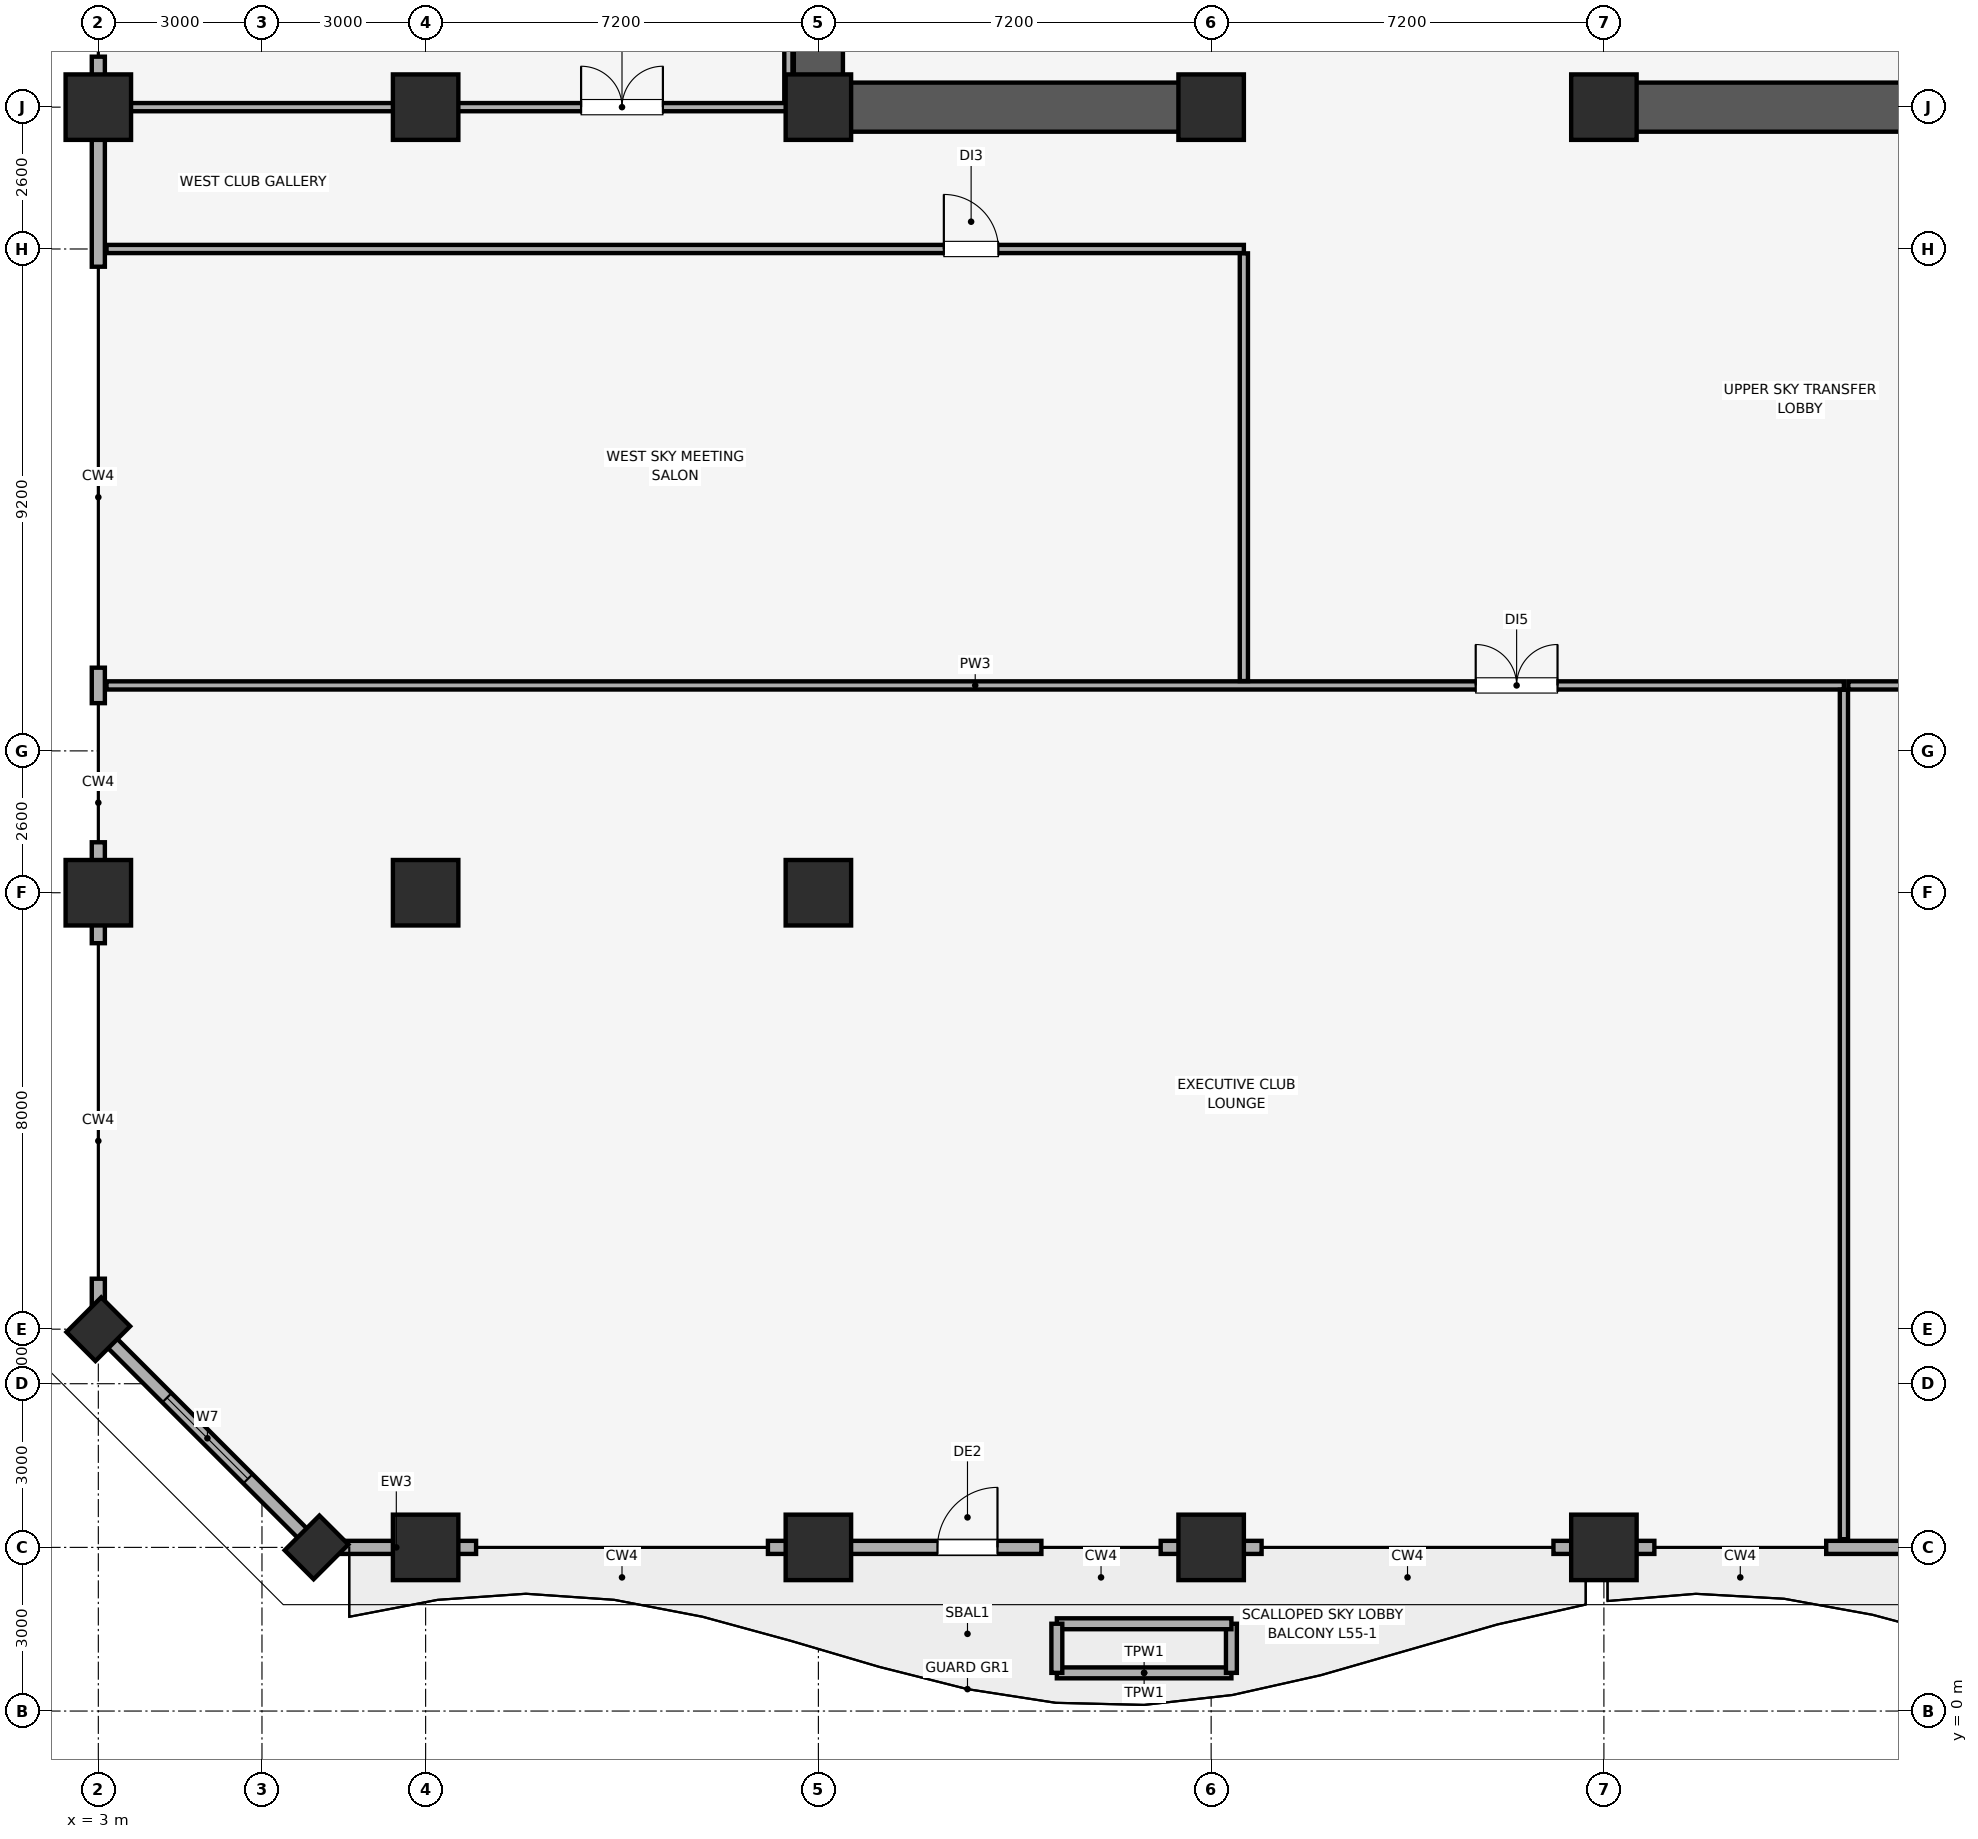
"""IFC4 building model, lengths in metres.
Left out: names, types, materials, properties, quantities, classifications, styles, units other than length and angle.
Written with IfcOpenShell. Run it as: python <this file> out.ifc"""

import sys

from ifc_helpers import new_model, si_unit, direction, frame, frame_2d, origin, origin_2d, place, context, subcontext, project, spatial, rectangle, extrude, element, fill, save


model = new_model("IFC4")
c1 = context("Model", 3, precision=1e-05, world=origin(), true_north=direction((0.0, 1.0)))
c2 = subcontext(c1, "Body", "Model", "MODEL_VIEW")
j1 = project(units=[si_unit("LENGTHUNIT", "METRE"), si_unit("PLANEANGLEUNIT", "RADIAN")], contexts=[c1])
p1 = place(None, origin())
s1 = spatial("IfcSite", under=j1, at=p1, CompositionType="ELEMENT")
p2 = place(p1, origin())
s2 = spatial("IfcBuilding", under=s1, at=p2, CompositionType="ELEMENT")
p3 = place(p2, frame((0.0, 0.0, 224.35)))
s3 = spatial("IfcBuildingStorey", under=s2, at=p3, CompositionType="ELEMENT", Elevation=224.35)
for number, where, z_axis, x_axis in (
    (1, (9.0, 3.0, 0.0), (0.0, 0.0, 1.0), (1.0, 0.0, 0.0)),
    (2, (16.2, 3.0, 0.0), (0.0, 0.0, 1.0), (1.0, 0.0, 0.0)),
    (3, (23.4, 3.0, 0.0), (0.0, 0.0, 1.0), (1.0, 0.0, 0.0)),
    (4, (30.6, 3.0, 0.0), (0.0, 0.0, 1.0), (1.0, 0.0, 0.0)),
    (5, (3.0, 15.0, 0.0), (0.0, 0.0, 1.0), (1.0, 0.0, 0.0)),
    (6, (3.0, 29.4, 0.0), (0.0, 0.0, 1.0), (1.0, 0.0, 0.0)),
):
    element("IfcColumn", number, at=place(p3, frame(where, z_axis=z_axis, x_axis=x_axis)), inside=s3, PredefinedType="COLUMN", context=c2, shape_type="SweptSolid", body=[
        extrude(rectangle(XDim=1.2, YDim=1.2, at=origin_2d()), origin(), (0.0, 0.0, 1.0), 4.56),
    ])
for number, where, z_axis, x_axis in (
    (7, (7.0, 3.0, 0.0), (0.0, 0.0, 1.0), (0.707, 0.707, 0.0)),
    (8, (3.0, 7.0, 0.0), (0.0, 0.0, 1.0), (0.707, 0.707, 0.0)),
):
    element("IfcColumn", number, at=place(p3, frame(where, z_axis=z_axis, x_axis=x_axis)), inside=s3, PredefinedType="PILASTER", context=c2, shape_type="SweptSolid", body=[
        extrude(rectangle(XDim=0.9, YDim=0.75, at=origin_2d()), origin(), (0.0, 0.0, 1.0), 4.56),
    ])
for number, where, z_axis, x_axis in (
    (9, (9.0, 15.0, 0.0), (0.0, 0.0, 1.0), (1.0, 0.0, 0.0)),
    (10, (16.2, 15.0, 0.0), (0.0, 0.0, 1.0), (1.0, 0.0, 0.0)),
    (11, (9.0, 29.4, 0.0), (0.0, 0.0, 1.0), (1.0, 0.0, 0.0)),
    (12, (16.2, 29.4, 0.0), (0.0, 0.0, 1.0), (1.0, 0.0, 0.0)),
    (13, (23.4, 29.4, 0.0), (0.0, 0.0, 1.0), (1.0, 0.0, 0.0)),
    (14, (30.6, 29.4, 0.0), (0.0, 0.0, 1.0), (1.0, 0.0, 0.0)),
):
    element("IfcColumn", number, at=place(p3, frame(where, z_axis=z_axis, x_axis=x_axis)), inside=s3, PredefinedType="COLUMN", context=c2, shape_type="SweptSolid", body=[
        extrude(rectangle(XDim=1.2, YDim=1.2, at=origin_2d()), origin(), (0.0, 0.0, 1.0), 4.56),
    ])
p4 = place(p3, frame((7.0, 3.0, 0.0), z_axis=(0.0, 0.0, 1.0), x_axis=(1.0, 0.0, 0.0)))
e15 = element("IfcWall", 15, at=p4, inside=s3, PredefinedType="SOLIDWALL", context=c2, shape_type="SweptSolid", body=[
    extrude(rectangle(XDim=2.925, YDim=0.24, at=frame_2d((1.462, 0.0))), origin(), (0.0, 0.0, 1.0), 4.52),
])
p5 = place(p3, frame((15.275, 3.0, 0.0), z_axis=(0.0, 0.0, 1.0), x_axis=(1.0, 0.0, 0.0)))
e16 = element("IfcWall", 16, at=p5, inside=s3, PredefinedType="SOLIDWALL", context=c2, shape_type="SweptSolid", body=[
    extrude(rectangle(XDim=5.013, YDim=0.24, at=frame_2d((2.507, 0.0))), origin(), (0.0, 0.0, 1.0), 3.4),
])
p6 = place(p5, frame((3.108, 0.0, 0.0)))
e17 = element("IfcOpeningElement", 17, at=p6, cuts=e16, PredefinedType="OPENING", context=c2, shape_type="SweptSolid", body=[
    extrude(rectangle(XDim=1.1, YDim=2.15, at=frame_2d((0.55, 1.075))), frame((0.0, 0.13, 0.0), z_axis=(0.0, -1.0, 0.0), x_axis=(1.0, 0.0, 0.0)), (0.0, 0.0, 1.0), 0.26),
])
for number, where, z_axis, x_axis in (
    (18, (22.475, 3.0, 0.0), (0.0, 0.0, 1.0), (1.0, 0.0, 0.0)),
    (19, (29.675, 3.0, 0.0), (0.0, 0.0, 1.0), (1.0, 0.0, 0.0)),
):
    element("IfcWall", number, at=place(p3, frame(where, z_axis=z_axis, x_axis=x_axis)), inside=s3, PredefinedType="SOLIDWALL", context=c2, shape_type="SweptSolid", body=[
        extrude(rectangle(XDim=1.85, YDim=0.24, at=frame_2d((0.925, 0.0))), origin(), (0.0, 0.0, 1.0), 4.52),
    ])
p7 = place(p3, frame((34.675, 3.0, 0.0), z_axis=(0.0, 0.0, 1.0), x_axis=(1.0, 0.0, 0.0)))
e20 = element("IfcWall", 20, at=p7, inside=s3, PredefinedType="SOLIDWALL", context=c2, shape_type="SweptSolid", body=[
    extrude(rectangle(XDim=4.05, YDim=0.24, at=frame_2d((2.025, 0.0))), origin(), (0.0, 0.0, 1.0), 3.4),
])
p8 = place(p3, frame((3.0, 30.325, 0.0), z_axis=(0.0, 0.0, 1.0), x_axis=(0.0, -1.0, 0.0)))
e21 = element("IfcWall", 21, at=p8, inside=s3, PredefinedType="SOLIDWALL", context=c2, shape_type="SweptSolid", body=[
    extrude(rectangle(XDim=3.85, YDim=0.24, at=frame_2d((1.925, 0.0))), origin(), (0.0, 0.0, 1.0), 4.52),
])
p9 = place(p3, frame((3.0, 19.125, 0.0), z_axis=(0.0, 0.0, 1.0), x_axis=(0.0, -1.0, 0.0)))
e22 = element("IfcWall", 22, at=p9, inside=s3, PredefinedType="SOLIDWALL", context=c2, shape_type="SweptSolid", body=[
    extrude(rectangle(XDim=0.65, YDim=0.24, at=frame_2d((0.325, 0.0))), origin(), (0.0, 0.0, 1.0), 4.52),
])
p10 = place(p3, frame((3.0, 15.925, 0.0), z_axis=(0.0, 0.0, 1.0), x_axis=(0.0, -1.0, 0.0)))
e23 = element("IfcWall", 23, at=p10, inside=s3, PredefinedType="SOLIDWALL", context=c2, shape_type="SweptSolid", body=[
    extrude(rectangle(XDim=1.85, YDim=0.24, at=frame_2d((0.925, 0.0))), origin(), (0.0, 0.0, 1.0), 4.52),
])
p11 = place(p3, frame((3.0, 7.925, 0.0), z_axis=(0.0, 0.0, 1.0), x_axis=(0.0, -1.0, 0.0)))
e24 = element("IfcWall", 24, at=p11, inside=s3, PredefinedType="SOLIDWALL", context=c2, shape_type="SweptSolid", body=[
    extrude(rectangle(XDim=0.925, YDim=0.24, at=frame_2d((0.462, 0.0))), origin(), (0.0, 0.0, 1.0), 4.52),
])
p12 = place(p3, frame((3.0, 7.0, 0.0), z_axis=(0.0, 0.0, 1.0), x_axis=(0.707106781187, -0.707106781187, 0.0)))
e25 = element("IfcWall", 25, at=p12, inside=s3, PredefinedType="SOLIDWALL", context=c2, shape_type="SweptSolid", body=[
    extrude(rectangle(XDim=5.657, YDim=0.24, at=frame_2d((2.828, 0.0))), origin(), (0.0, 0.0, 1.0), 4.52),
])
p13 = place(p12, frame((1.778, 0.0, 0.85)))
e26 = element("IfcOpeningElement", 26, at=p13, cuts=e25, PredefinedType="OPENING", context=c2, shape_type="SweptSolid", body=[
    extrude(rectangle(XDim=2.1, YDim=1.6, at=frame_2d((1.05, 0.8))), frame((0.0, 0.13, 0.0), z_axis=(0.0, -1.0, 0.0), x_axis=(1.0, 0.0, 0.0)), (0.0, 0.0, 1.0), 0.26),
])
p14 = place(p3, frame((20.572, 0.7, 0.0), z_axis=(0.0, 0.0, 1.0), x_axis=(1.0, 0.0, 0.0)))
e27 = element("IfcWall", 27, at=p14, inside=s3, PredefinedType="PARAPET", context=c2, shape_type="SweptSolid", body=[
    extrude(rectangle(XDim=3.2, YDim=0.2, at=frame_2d((1.6, 0.0))), origin(), (0.0, 0.0, 1.0), 0.55),
])
p15 = place(p3, frame((23.771, 0.7, 0.0), z_axis=(0.0, 0.0, 1.0), x_axis=(0.0, 1.0, 0.0)))
e28 = element("IfcWall", 28, at=p15, inside=s3, PredefinedType="PARAPET", context=c2, shape_type="SweptSolid", body=[
    extrude(rectangle(XDim=0.9, YDim=0.2, at=frame_2d((0.45, 0.0))), origin(), (0.0, 0.0, 1.0), 0.55),
])
p16 = place(p3, frame((23.771, 1.6, 0.0), z_axis=(0.0, 0.0, 1.0), x_axis=(-1.0, 0.0, 0.0)))
e29 = element("IfcWall", 29, at=p16, inside=s3, PredefinedType="PARAPET", context=c2, shape_type="SweptSolid", body=[
    extrude(rectangle(XDim=3.2, YDim=0.2, at=frame_2d((1.6, 0.0))), origin(), (0.0, 0.0, 1.0), 0.55),
])
p17 = place(p3, frame((20.572, 1.6, 0.0), z_axis=(0.0, 0.0, 1.0), x_axis=(0.0, -1.0, 0.0)))
e30 = element("IfcWall", 30, at=p17, inside=s3, PredefinedType="PARAPET", context=c2, shape_type="SweptSolid", body=[
    extrude(rectangle(XDim=0.9, YDim=0.2, at=frame_2d((0.45, 0.0))), origin(), (0.0, 0.0, 1.0), 0.55),
])
p18 = place(p3, frame((16.2, 29.4, 0.0), z_axis=(0.0, 0.0, 1.0), x_axis=(0.0, 1.0, 0.0)))
e31 = element("IfcWall", 31, at=p18, inside=s3, PredefinedType="SHEAR", context=c2, shape_type="SweptSolid", body=[
    extrude(rectangle(XDim=19.2, YDim=0.9, at=frame_2d((9.6, 0.0))), origin(), (0.0, 0.0, 1.0), 4.52),
])
p19 = place(p3, frame((16.655, 29.4, 0.0), z_axis=(0.0, 0.0, 1.0), x_axis=(1.0, 0.0, 0.0)))
e32 = element("IfcWall", 32, at=p19, inside=s3, PredefinedType="SHEAR", context=c2, shape_type="SweptSolid", body=[
    extrude(rectangle(XDim=6.945, YDim=0.9, at=frame_2d((3.473, 0.0))), origin(), (0.0, 0.0, 1.0), 4.52),
])
p20 = place(p3, frame((30.4, 29.4, 0.0), z_axis=(0.0, 0.0, 1.0), x_axis=(1.0, 0.0, 0.0)))
e33 = element("IfcWall", 33, at=p20, inside=s3, PredefinedType="SHEAR", context=c2, shape_type="SweptSolid", body=[
    extrude(rectangle(XDim=7.6, YDim=0.9, at=frame_2d((3.8, 0.0))), origin(), (0.0, 0.0, 1.0), 4.52),
])
p21 = place(p3, frame((3.15, 18.8, 0.0), z_axis=(0.0, 0.0, 1.0), x_axis=(1.0, 0.0, 0.0)))
e34 = element("IfcWall", 34, at=p21, inside=s3, PredefinedType="PARTITIONING", context=c2, shape_type="SweptSolid", body=[
    extrude(rectangle(XDim=31.85, YDim=0.15, at=frame_2d((15.925, 0.0))), origin(), (0.0, 0.0, 1.0), 4.52),
])
p22 = place(p21, frame((25.1, 0.0, 0.0)))
e35 = element("IfcOpeningElement", 35, at=p22, cuts=e34, PredefinedType="OPENING", context=c2, shape_type="SweptSolid", body=[
    extrude(rectangle(XDim=1.5, YDim=2.25, at=frame_2d((0.75, 1.125))), frame((0.0, 0.085, 0.0), z_axis=(0.0, -1.0, 0.0), x_axis=(1.0, 0.0, 0.0)), (0.0, 0.0, 1.0), 0.17),
])
p23 = place(p3, frame((35.0, 3.15, 0.0), z_axis=(0.0, 0.0, 1.0), x_axis=(0.0, 1.0, 0.0)))
e36 = element("IfcWall", 36, at=p23, inside=s3, PredefinedType="PARTITIONING", context=c2, shape_type="SweptSolid", body=[
    extrude(rectangle(XDim=15.57, YDim=0.15, at=frame_2d((7.785, 0.0))), origin(), (0.0, 0.0, 1.0), 4.52),
])
p24 = place(p3, frame((35.08, 18.8, 0.0), z_axis=(0.0, 0.0, 1.0), x_axis=(1.0, 0.0, 0.0)))
e37 = element("IfcWall", 37, at=p24, inside=s3, PredefinedType="PARTITIONING", context=c2, shape_type="SweptSolid", body=[
    extrude(rectangle(XDim=16.92, YDim=0.15, at=frame_2d((8.46, 0.0))), origin(), (0.0, 0.0, 1.0), 4.52),
])
p25 = place(p24, frame((6.17, 0.0, 0.0)))
e38 = element("IfcOpeningElement", 38, at=p25, cuts=e37, PredefinedType="OPENING", context=c2, shape_type="SweptSolid", body=[
    extrude(rectangle(XDim=1.5, YDim=2.25, at=frame_2d((0.75, 1.125))), frame((0.0, 0.085, 0.0), z_axis=(0.0, -1.0, 0.0), x_axis=(1.0, 0.0, 0.0)), (0.0, 0.0, 1.0), 0.17),
])
p26 = place(p3, frame((3.15, 26.8, 0.0), z_axis=(0.0, 0.0, 1.0), x_axis=(1.0, 0.0, 0.0)))
e39 = element("IfcWall", 39, at=p26, inside=s3, PredefinedType="PARTITIONING", context=c2, shape_type="SweptSolid", body=[
    extrude(rectangle(XDim=20.85, YDim=0.15, at=frame_2d((10.425, 0.0))), origin(), (0.0, 0.0, 1.0), 4.52),
])
p27 = place(p26, frame((15.35, 0.0, 0.0)))
e40 = element("IfcOpeningElement", 40, at=p27, cuts=e39, PredefinedType="OPENING", context=c2, shape_type="SweptSolid", body=[
    extrude(rectangle(XDim=1.0, YDim=2.15, at=frame_2d((0.5, 1.075))), frame((0.0, 0.085, 0.0), z_axis=(0.0, -1.0, 0.0), x_axis=(1.0, 0.0, 0.0)), (0.0, 0.0, 1.0), 0.17),
])
p28 = place(p3, frame((24.0, 18.88, 0.0), z_axis=(0.0, 0.0, 1.0), x_axis=(0.0, 1.0, 0.0)))
e41 = element("IfcWall", 41, at=p28, inside=s3, PredefinedType="PARTITIONING", context=c2, shape_type="SweptSolid", body=[
    extrude(rectangle(XDim=7.84, YDim=0.15, at=frame_2d((3.92, 0.0))), origin(), (0.0, 0.0, 1.0), 4.52),
])
p29 = place(p3, frame((3.15, 29.4, 0.0), z_axis=(0.0, 0.0, 1.0), x_axis=(1.0, 0.0, 0.0)))
e42 = element("IfcWall", 42, at=p29, inside=s3, PredefinedType="PARTITIONING", context=c2, shape_type="SweptSolid", body=[
    extrude(rectangle(XDim=12.5, YDim=0.15, at=frame_2d((6.25, 0.0))), origin(), (0.0, 0.0, 1.0), 3.4),
])
p30 = place(p29, frame((8.7, 0.0, 0.0)))
e43 = element("IfcOpeningElement", 43, at=p30, cuts=e42, PredefinedType="OPENING", context=c2, shape_type="SweptSolid", body=[
    extrude(rectangle(XDim=1.5, YDim=2.25, at=frame_2d((0.75, 1.125))), frame((0.0, 0.085, 0.0), z_axis=(0.0, -1.0, 0.0), x_axis=(1.0, 0.0, 0.0)), (0.0, 0.0, 1.0), 0.17),
])
p31 = place(p3, frame((15.65, 29.48, 0.0), z_axis=(0.0, 0.0, 1.0), x_axis=(0.0, 1.0, 0.0)))
e44 = element("IfcWall", 44, at=p31, inside=s3, PredefinedType="PARTITIONING", context=c2, shape_type="SweptSolid", body=[
    extrude(rectangle(XDim=19.37, YDim=0.15, at=frame_2d((9.685, 0.0))), origin(), (0.0, 0.0, 1.0), 4.52),
])
p32 = place(p13, origin())
e45 = element("IfcWindow", 45, at=p32, inside=s3, PartitioningType="SINGLE_PANEL", PredefinedType="WINDOW", context=c2, shape_type="SweptSolid", body=[
    extrude(rectangle(XDim=2.1, YDim=1.6, at=frame_2d((1.05, 0.8))), frame((0.0, 0.03, 0.0), z_axis=(0.0, -1.0, 0.0), x_axis=(1.0, 0.0, 0.0)), (0.0, 0.0, 1.0), 0.06),
])
fill(e26, e45)
p33 = place(p6, origin())
e46 = element("IfcDoor", 46, at=p33, inside=s3, OperationType="SINGLE_SWING_RIGHT", PredefinedType="DOOR", context=c2, shape_type="SweptSolid", body=[
    extrude(rectangle(XDim=1.1, YDim=2.15, at=frame_2d((0.55, 1.075))), frame((0.0, 0.025, 0.0), z_axis=(0.0, -1.0, 0.0), x_axis=(1.0, 0.0, 0.0)), (0.0, 0.0, 1.0), 0.05),
])
fill(e17, e46)
p34 = place(p22, origin())
e47 = element("IfcDoor", 47, at=p34, inside=s3, OperationType="DOUBLE_DOOR_SINGLE_SWING", PredefinedType="DOOR", context=c2, shape_type="SweptSolid", body=[
    extrude(rectangle(XDim=1.5, YDim=2.25, at=frame_2d((0.75, 1.125))), frame((0.0, 0.025, 0.0), z_axis=(0.0, -1.0, 0.0), x_axis=(1.0, 0.0, 0.0)), (0.0, 0.0, 1.0), 0.05),
])
fill(e35, e47)
p35 = place(p27, origin())
e48 = element("IfcDoor", 48, at=p35, inside=s3, OperationType="SINGLE_SWING_LEFT", PredefinedType="DOOR", context=c2, shape_type="SweptSolid", body=[
    extrude(rectangle(XDim=1.0, YDim=2.15, at=frame_2d((0.5, 1.075))), frame((0.0, 0.025, 0.0), z_axis=(0.0, -1.0, 0.0), x_axis=(1.0, 0.0, 0.0)), (0.0, 0.0, 1.0), 0.05),
])
fill(e40, e48)
p36 = place(p30, origin())
e49 = element("IfcDoor", 49, at=p36, inside=s3, OperationType="DOUBLE_DOOR_SINGLE_SWING", PredefinedType="DOOR", context=c2, shape_type="SweptSolid", body=[
    extrude(rectangle(XDim=1.5, YDim=2.25, at=frame_2d((0.75, 1.125))), frame((0.0, 0.025, 0.0), z_axis=(0.0, -1.0, 0.0), x_axis=(1.0, 0.0, 0.0)), (0.0, 0.0, 1.0), 0.05),
])
fill(e43, e49)
save(model, sys.argv[1])
